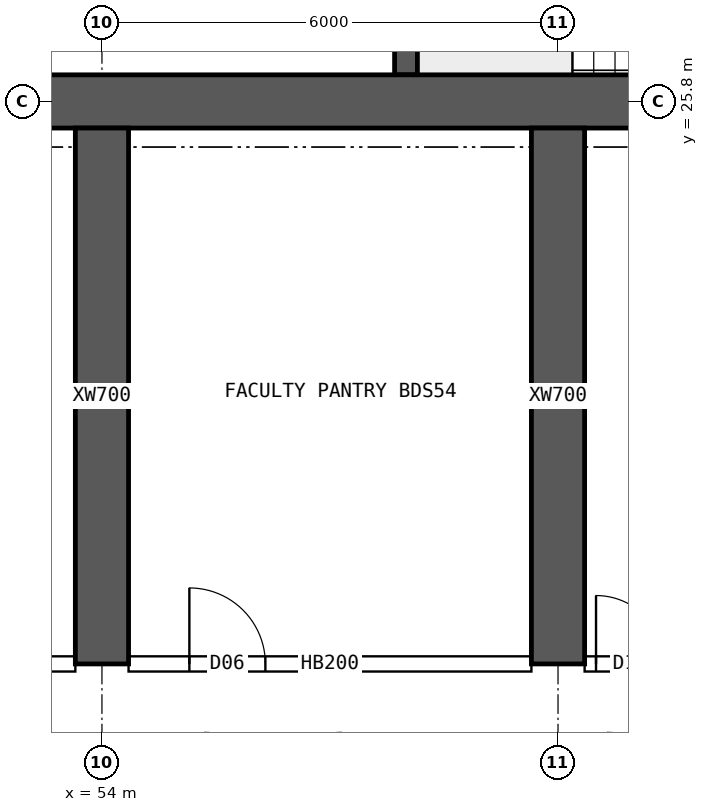
"""IFC4 building model, lengths in metres.
Left out: names, types, materials, properties, quantities, classifications, styles, units other than length and angle.
Written with IfcOpenShell. Run it as: python <this file> out.ifc"""

import sys

from ifc_helpers import new_model, si_unit, direction, frame, frame_2d, origin, place, context, subcontext, project, spatial, rectangle, extrude, element, fill, save


model = new_model("IFC4")
c1 = context("Model", 3, precision=1e-05, world=origin(), true_north=direction((0.0, 1.0)))
c2 = subcontext(c1, "Body", "Model", "MODEL_VIEW")
j1 = project(units=[si_unit("LENGTHUNIT", "METRE"), si_unit("PLANEANGLEUNIT", "RADIAN")], contexts=[c1])
p1 = place(None, origin())
s1 = spatial("IfcSite", under=j1, at=p1, CompositionType="ELEMENT")
p2 = place(p1, origin())
s2 = spatial("IfcBuilding", under=s1, at=p2, CompositionType="ELEMENT")
p3 = place(p2, frame((0.0, 0.0, 208.3)))
s3 = spatial("IfcBuildingStorey", under=s2, at=p3, CompositionType="ELEMENT", Elevation=208.3)
p4 = place(p3, frame((18.0, 25.8, 0.0), z_axis=(0.0, 0.0, 1.0), x_axis=(1.0, 0.0, 0.0)))
e1 = element("IfcWall", 1, at=p4, inside=s3, PredefinedType="SHEAR", context=c2, shape_type="SweptSolid", body=[
    extrude(rectangle(XDim=48.0, YDim=0.7, at=frame_2d((24.0, 0.0))), origin(), (0.0, 0.0, 1.0), 4.5),
])
p5 = place(p3, frame((58.0, 26.15, 0.0), z_axis=(0.0, 0.0, 1.0), x_axis=(0.0, 1.0, 0.0)))
e2 = element("IfcWall", 2, at=p5, inside=s3, PredefinedType="SHEAR", context=c2, shape_type="SweptSolid", body=[
    extrude(rectangle(XDim=4.1, YDim=0.3, at=frame_2d((2.05, 0.0))), origin(), (0.0, 0.0, 1.0), 4.5),
])
for number, where, z_axis, x_axis in (
    (3, (54.0, 18.4, 0.0), (0.0, 0.0, 1.0), (0.0, 1.0, 0.0)),
    (4, (60.0, 18.4, 0.0), (0.0, 0.0, 1.0), (0.0, 1.0, 0.0)),
):
    element("IfcWall", number, at=place(p3, frame(where, z_axis=z_axis, x_axis=x_axis)), inside=s3, PredefinedType="SHEAR", context=c2, shape_type="SweptSolid", body=[
        extrude(rectangle(XDim=7.05, YDim=0.7, at=frame_2d((3.525, 0.0))), origin(), (0.0, 0.0, 1.0), 4.5),
    ])
p6 = place(p3, frame((48.35, 18.4, 0.0), z_axis=(0.0, 0.0, 1.0), x_axis=(1.0, 0.0, 0.0)))
e5 = element("IfcWall", 5, at=p6, inside=s3, PredefinedType="SOLIDWALL", context=c2, shape_type="SweptSolid", body=[
    extrude(rectangle(XDim=5.3, YDim=0.2, at=frame_2d((2.65, 0.0))), origin(), (0.0, 0.0, 1.0), 4.25),
])
p7 = place(p6, frame((0.15, 0.0, 0.0)))
e6 = element("IfcOpeningElement", 6, at=p7, cuts=e5, PredefinedType="OPENING", context=c2, shape_type="SweptSolid", body=[
    extrude(rectangle(XDim=0.9, YDim=2.1, at=frame_2d((0.45, 1.05))), frame((0.0, 0.11, 0.0), z_axis=(0.0, -1.0, 0.0), x_axis=(1.0, 0.0, 0.0)), (0.0, 0.0, 1.0), 0.22),
])
p8 = place(p6, frame((2.51, 0.0, 0.0)))
e7 = element("IfcOpeningElement", 7, at=p8, cuts=e5, PredefinedType="OPENING", context=c2, shape_type="SweptSolid", body=[
    extrude(rectangle(XDim=0.9, YDim=2.1, at=frame_2d((0.45, 1.05))), frame((0.0, 0.11, 0.0), z_axis=(0.0, -1.0, 0.0), x_axis=(1.0, 0.0, 0.0)), (0.0, 0.0, 1.0), 0.22),
])
p9 = place(p3, frame((54.35, 18.4, 0.0), z_axis=(0.0, 0.0, 1.0), x_axis=(1.0, 0.0, 0.0)))
e8 = element("IfcWall", 8, at=p9, inside=s3, PredefinedType="SOLIDWALL", context=c2, shape_type="SweptSolid", body=[
    extrude(rectangle(XDim=5.3, YDim=0.2, at=frame_2d((2.65, 0.0))), origin(), (0.0, 0.0, 1.0), 4.25),
])
p10 = place(p9, frame((0.8, 0.0, 0.0)))
e9 = element("IfcOpeningElement", 9, at=p10, cuts=e8, PredefinedType="OPENING", context=c2, shape_type="SweptSolid", body=[
    extrude(rectangle(XDim=1.0, YDim=2.1, at=frame_2d((0.5, 1.05))), frame((0.0, 0.11, 0.0), z_axis=(0.0, -1.0, 0.0), x_axis=(1.0, 0.0, 0.0)), (0.0, 0.0, 1.0), 0.22),
])
p11 = place(p3, frame((60.35, 18.4, 0.0), z_axis=(0.0, 0.0, 1.0), x_axis=(1.0, 0.0, 0.0)))
e10 = element("IfcWall", 10, at=p11, inside=s3, PredefinedType="SOLIDWALL", context=c2, shape_type="SweptSolid", body=[
    extrude(rectangle(XDim=5.3, YDim=0.2, at=frame_2d((2.65, 0.0))), origin(), (0.0, 0.0, 1.0), 4.25),
])
p12 = place(p11, frame((0.15, 0.0, 0.0)))
e11 = element("IfcOpeningElement", 11, at=p12, cuts=e10, PredefinedType="OPENING", context=c2, shape_type="SweptSolid", body=[
    extrude(rectangle(XDim=0.9, YDim=2.1, at=frame_2d((0.45, 1.05))), frame((0.0, 0.11, 0.0), z_axis=(0.0, -1.0, 0.0), x_axis=(1.0, 0.0, 0.0)), (0.0, 0.0, 1.0), 0.22),
])
p13 = place(p11, frame((3.435, 0.0, 0.0)))
e12 = element("IfcOpeningElement", 12, at=p13, cuts=e10, PredefinedType="OPENING", context=c2, shape_type="SweptSolid", body=[
    extrude(rectangle(XDim=0.9, YDim=2.1, at=frame_2d((0.45, 1.05))), frame((0.0, 0.11, 0.0), z_axis=(0.0, -1.0, 0.0), x_axis=(1.0, 0.0, 0.0)), (0.0, 0.0, 1.0), 0.22),
])
p14 = place(p10, origin())
e13 = element("IfcDoor", 13, at=p14, inside=s3, OperationType="SINGLE_SWING_LEFT", PredefinedType="DOOR", context=c2, shape_type="SweptSolid", body=[
    extrude(rectangle(XDim=1.0, YDim=2.1, at=frame_2d((0.5, 1.05))), frame((0.0, 0.025, 0.0), z_axis=(0.0, -1.0, 0.0), x_axis=(1.0, 0.0, 0.0)), (0.0, 0.0, 1.0), 0.05),
])
fill(e9, e13)
p15 = place(p12, origin())
e14 = element("IfcDoor", 14, at=p15, inside=s3, OperationType="SINGLE_SWING_LEFT", PredefinedType="DOOR", context=c2, shape_type="SweptSolid", body=[
    extrude(rectangle(XDim=0.9, YDim=2.1, at=frame_2d((0.45, 1.05))), frame((0.0, 0.025, 0.0), z_axis=(0.0, -1.0, 0.0), x_axis=(1.0, 0.0, 0.0)), (0.0, 0.0, 1.0), 0.05),
])
fill(e11, e14)
save(model, sys.argv[1])
